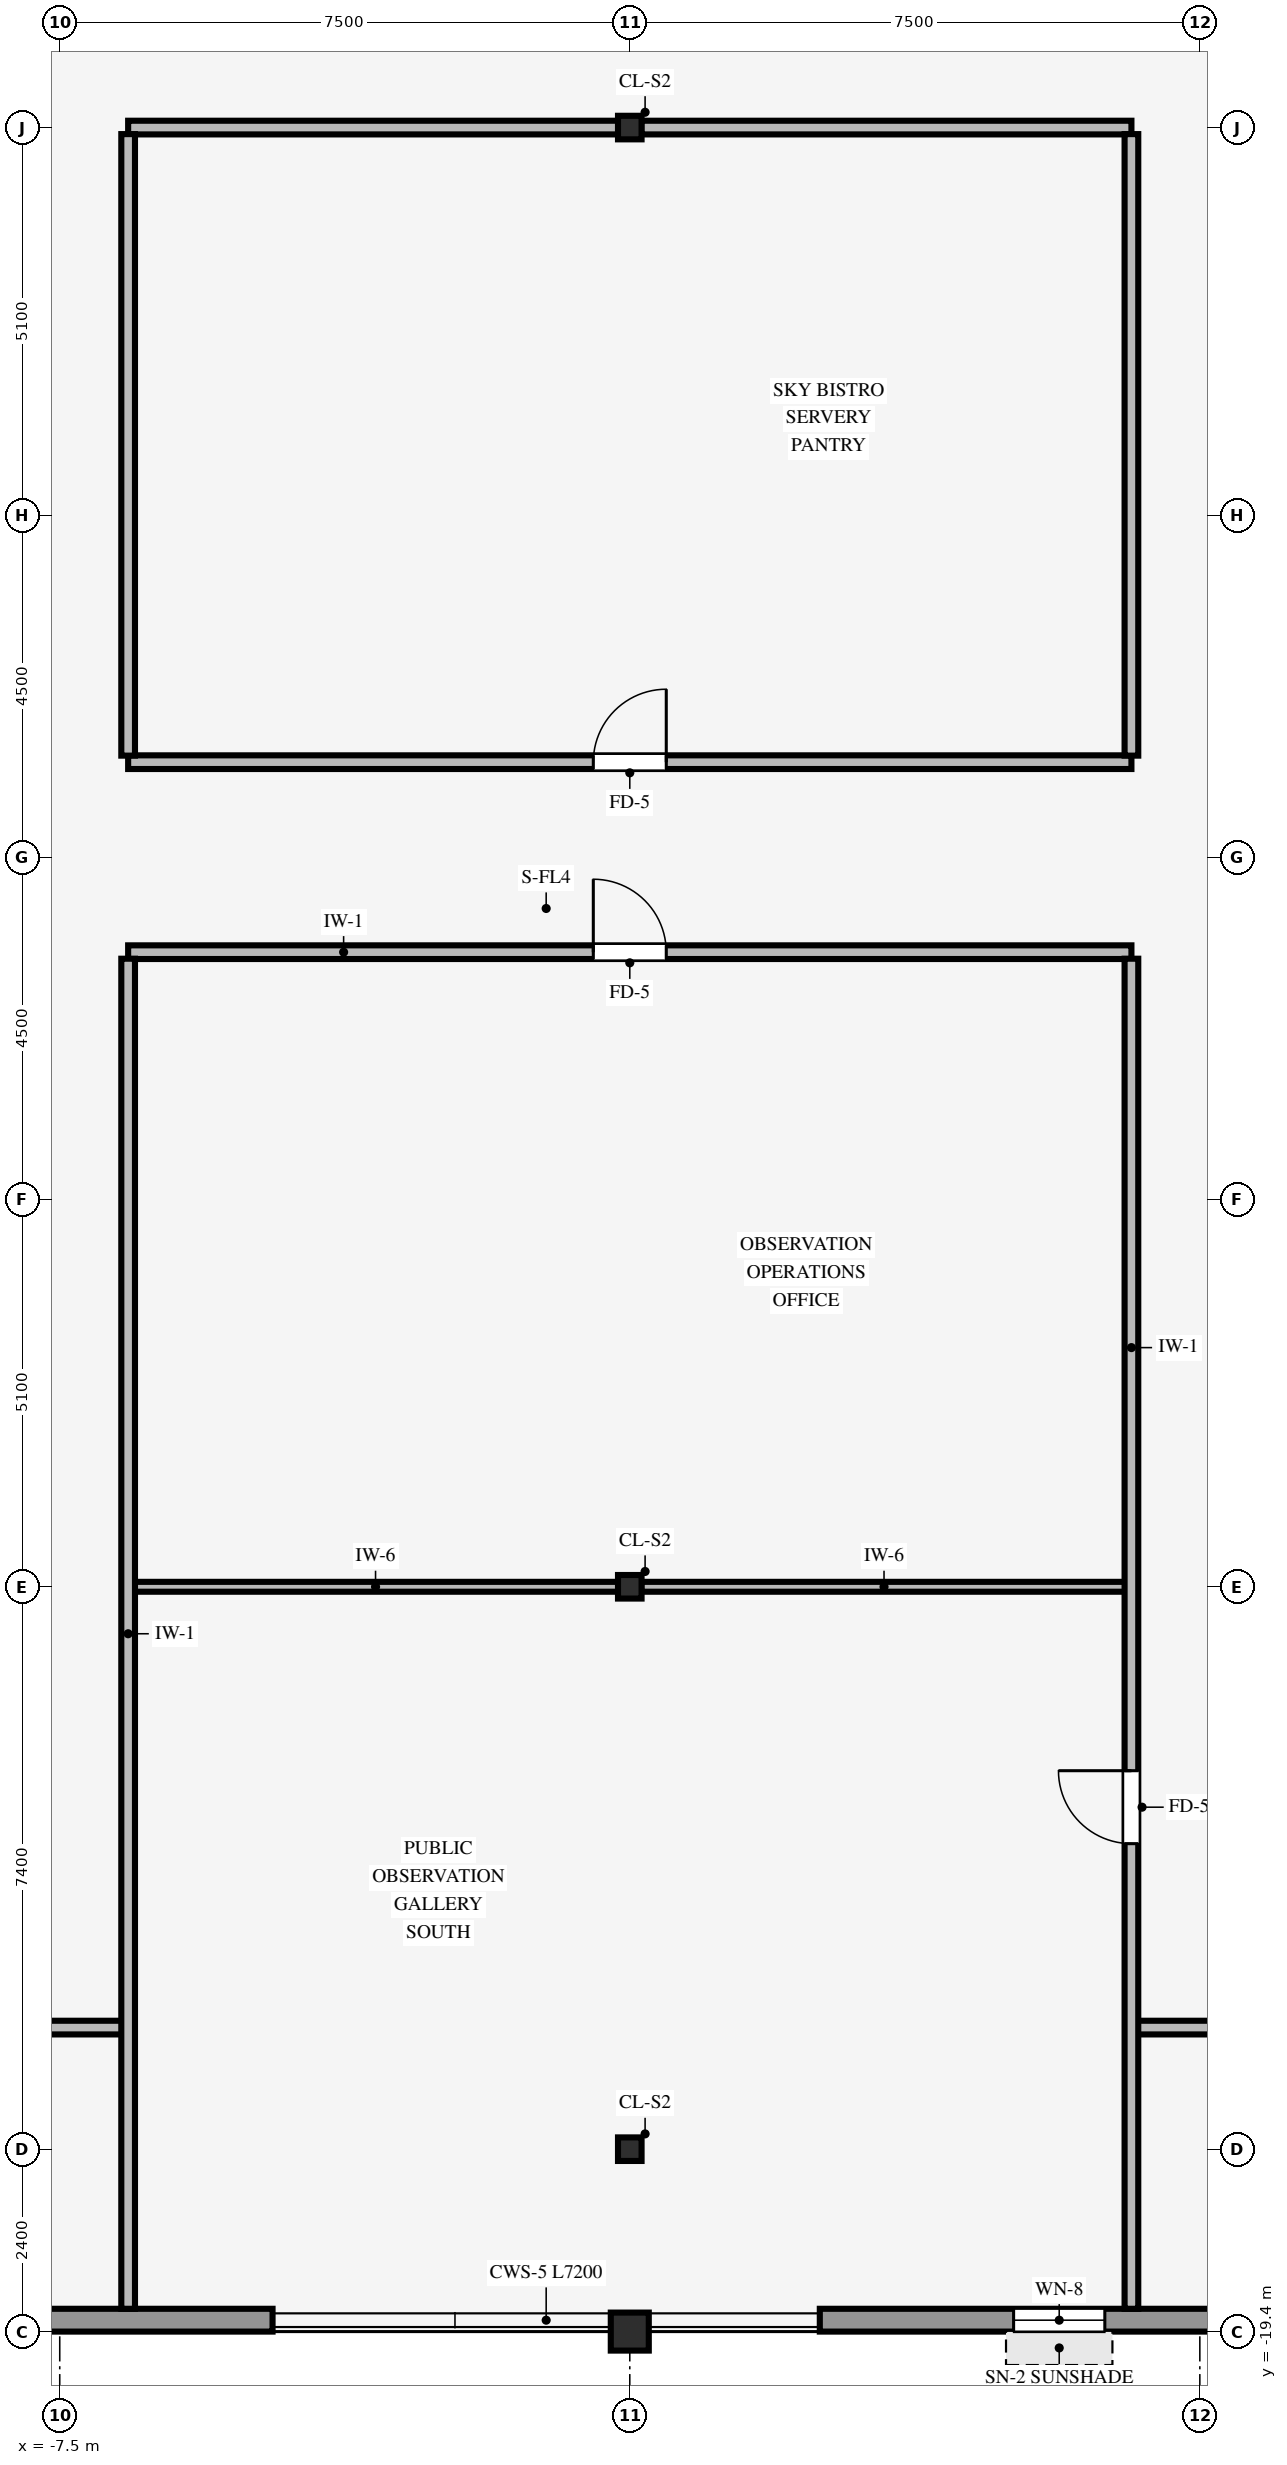
"""IFC4 building model, lengths in metres.
Left out: names, types, materials, properties, quantities, classifications, styles, units other than length and angle.
Written with IfcOpenShell. Run it as: python <this file> out.ifc"""

import sys

from ifc_helpers import new_model, si_unit, direction, frame, frame_2d, origin, origin_2d, place, context, subcontext, project, spatial, rectangle, hollow_rectangle, i_section, extrude, source, transform, mapped, element, fill, save


model = new_model("IFC4")
c1 = context("Model", 3, precision=1e-05, world=origin(), true_north=direction((0.0, 1.0)))
c2 = subcontext(c1, "Body", "Model", "MODEL_VIEW")
j1 = project(units=[si_unit("LENGTHUNIT", "METRE"), si_unit("PLANEANGLEUNIT", "RADIAN")], contexts=[c1])
p1 = place(None, origin())
s1 = spatial("IfcSite", under=j1, at=p1, CompositionType="ELEMENT")
p2 = place(p1, origin())
s2 = spatial("IfcBuilding", under=s1, at=p2, CompositionType="ELEMENT")
p3 = place(p2, frame((0.0, 0.0, 283.5)))
s3 = spatial("IfcBuildingStorey", under=s2, at=p3, CompositionType="ELEMENT", Elevation=283.5)
p4 = place(p3, frame((0.0, -19.4, 0.0), z_axis=(0.0, 0.0, 1.0), x_axis=(1.0, 0.0, 0.0)))
e1 = element("IfcColumn", 1, at=p4, inside=s3, PredefinedType="COLUMN", context=c2, shape_type="SweptSolid", body=[
    extrude(hollow_rectangle(XDim=0.5, YDim=0.5, WallThickness=0.032, InnerFilletRadius=0.032, OuterFilletRadius=0.064, at=origin_2d()), origin(), (0.0, 0.0, 1.0), 3.25),
])
for number, where, z_axis, x_axis in (
    (2, (0.0, -17.0, 0.0), (0.0, 0.0, 1.0), (1.0, 0.0, 0.0)),
    (3, (0.0, -9.6, 0.0), (0.0, 0.0, 1.0), (1.0, 0.0, 0.0)),
    (4, (0.0, 9.6, 0.0), (0.0, 0.0, 1.0), (1.0, 0.0, 0.0)),
):
    element("IfcColumn", number, at=place(p3, frame(where, z_axis=z_axis, x_axis=x_axis)), inside=s3, PredefinedType="COLUMN", context=c2, shape_type="SweptSolid", body=[
        extrude(i_section(OverallWidth=0.31, OverallDepth=0.31, WebThickness=0.015, FlangeThickness=0.015, FilletRadius=0.015, at=origin_2d()), origin(), (0.0, 0.0, 1.0), 3.25),
    ])
p5 = place(p3, frame((-18.9, -19.25, 0.0), z_axis=(0.0, 0.0, 1.0), x_axis=(1.0, 0.0, 0.0)))
e5 = element("IfcWall", 5, at=p5, inside=s3, PredefinedType="STANDARD", context=c2, shape_type="SweptSolid", body=[
    extrude(rectangle(XDim=14.2, YDim=0.3, at=frame_2d((7.1, 0.0))), origin(), (0.0, 0.0, 1.0), 3.24),
])
p6 = place(p5, frame((3.45, 0.0, 0.8)))
e6 = element("IfcOpeningElement", 6, at=p6, cuts=e5, PredefinedType="OPENING", context=c2, shape_type="SweptSolid", body=[
    extrude(rectangle(XDim=1.2, YDim=1.48, at=frame_2d((0.6, 0.74))), frame((0.0, 0.16, 0.0), z_axis=(0.0, -1.0, 0.0), x_axis=(1.0, 0.0, 0.0)), (0.0, 0.0, 1.0), 0.32),
])
p7 = place(p3, frame((2.5, -19.25, 0.0), z_axis=(0.0, 0.0, 1.0), x_axis=(1.0, 0.0, 0.0)))
e7 = element("IfcWall", 7, at=p7, inside=s3, PredefinedType="STANDARD", context=c2, shape_type="SweptSolid", body=[
    extrude(rectangle(XDim=14.2, YDim=0.3, at=frame_2d((7.1, 0.0))), origin(), (0.0, 0.0, 1.0), 3.24),
])
p8 = place(p7, frame((2.55, 0.0, 0.8)))
e8 = element("IfcOpeningElement", 8, at=p8, cuts=e7, PredefinedType="OPENING", context=c2, shape_type="SweptSolid", body=[
    extrude(rectangle(XDim=1.2, YDim=1.48, at=frame_2d((0.6, 0.74))), frame((0.0, 0.16, 0.0), z_axis=(0.0, -1.0, 0.0), x_axis=(1.0, 0.0, 0.0)), (0.0, 0.0, 1.0), 0.32),
])
p9 = place(p7, frame((9.55, 0.0, 0.8)))
e9 = element("IfcOpeningElement", 9, at=p9, cuts=e7, PredefinedType="OPENING", context=c2, shape_type="SweptSolid", body=[
    extrude(rectangle(XDim=1.2, YDim=1.48, at=frame_2d((0.6, 0.74))), frame((0.0, 0.16, 0.0), z_axis=(0.0, -1.0, 0.0), x_axis=(1.0, 0.0, 0.0)), (0.0, 0.0, 1.0), 0.32),
])
for number, where, z_axis, x_axis in (
    (10, (-9.0, -15.4, 0.0), (0.0, 0.0, 1.0), (1.0, 0.0, 0.0)),
    (11, (6.661, -15.4, 0.0), (0.0, 0.0, 1.0), (1.0, 0.0, 0.0)),
):
    element("IfcWall", number, at=place(p3, frame(where, z_axis=z_axis, x_axis=x_axis)), inside=s3, PredefinedType="PARTITIONING", context=c2, shape_type="SweptSolid", body=[
        extrude(rectangle(XDim=2.339, YDim=0.18, at=frame_2d((1.169, 0.0))), origin(), (0.0, 0.0, 1.0), 3.24),
    ])
for number, where, z_axis, x_axis in (
    (12, (-6.539, -9.6, 0.0), (0.0, 0.0, 1.0), (1.0, 0.0, 0.0)),
    (13, (0.151, -9.6, 0.0), (0.0, 0.0, 1.0), (1.0, 0.0, 0.0)),
):
    element("IfcWall", number, at=place(p3, frame(where, z_axis=z_axis, x_axis=x_axis)), inside=s3, PredefinedType="PARTITIONING", context=c2, shape_type="SweptSolid", body=[
        extrude(rectangle(XDim=6.388, YDim=0.13, at=frame_2d((3.194, 0.0))), origin(), (0.0, 0.0, 1.0), 2.285),
    ])
p10 = place(p3, frame((-6.6, -1.25, 0.0), z_axis=(0.0, 0.0, 1.0), x_axis=(1.0, 0.0, 0.0)))
e14 = element("IfcWall", 14, at=p10, inside=s3, PredefinedType="PARTITIONING", context=c2, shape_type="SweptSolid", body=[
    extrude(rectangle(XDim=13.2, YDim=0.18, at=frame_2d((6.6, 0.0))), origin(), (0.0, 0.0, 1.0), 3.24),
])
p11 = place(p10, frame((6.12, 0.0, 0.0)))
e15 = element("IfcOpeningElement", 15, at=p11, cuts=e14, PredefinedType="OPENING", context=c2, shape_type="SweptSolid", body=[
    extrude(rectangle(XDim=0.96, YDim=2.1, at=frame_2d((0.48, 1.05))), frame((0.0, 0.1, 0.0), z_axis=(0.0, -1.0, 0.0), x_axis=(1.0, 0.0, 0.0)), (0.0, 0.0, 1.0), 0.2),
])
p12 = place(p3, frame((-6.6, 1.25, 0.0), z_axis=(0.0, 0.0, 1.0), x_axis=(1.0, 0.0, 0.0)))
e16 = element("IfcWall", 16, at=p12, inside=s3, PredefinedType="PARTITIONING", context=c2, shape_type="SweptSolid", body=[
    extrude(rectangle(XDim=13.2, YDim=0.18, at=frame_2d((6.6, 0.0))), origin(), (0.0, 0.0, 1.0), 3.24),
])
p13 = place(p12, frame((6.12, 0.0, 0.0)))
e17 = element("IfcOpeningElement", 17, at=p13, cuts=e16, PredefinedType="OPENING", context=c2, shape_type="SweptSolid", body=[
    extrude(rectangle(XDim=0.96, YDim=2.1, at=frame_2d((0.48, 1.05))), frame((0.0, 0.1, 0.0), z_axis=(0.0, -1.0, 0.0), x_axis=(1.0, 0.0, 0.0)), (0.0, 0.0, 1.0), 0.2),
])
for number, where, z_axis, x_axis in (
    (18, (-6.6, 9.6, 0.0), (0.0, 0.0, 1.0), (1.0, 0.0, 0.0)),
    (19, (0.151, 9.6, 0.0), (0.0, 0.0, 1.0), (1.0, 0.0, 0.0)),
):
    element("IfcWall", number, at=place(p3, frame(where, z_axis=z_axis, x_axis=x_axis)), inside=s3, PredefinedType="PARTITIONING", context=c2, shape_type="SweptSolid", body=[
        extrude(rectangle(XDim=6.449, YDim=0.18, at=frame_2d((3.225, 0.0))), origin(), (0.0, 0.0, 1.0), 2.285),
    ])
p14 = place(p3, frame((-6.6, -19.1, 0.0), z_axis=(0.0, 0.0, 1.0), x_axis=(0.0, 1.0, 0.0)))
e20 = element("IfcWall", 20, at=p14, inside=s3, PredefinedType="PARTITIONING", context=c2, shape_type="SweptSolid", body=[
    extrude(rectangle(XDim=17.764, YDim=0.18, at=frame_2d((8.882, 0.0))), origin(), (0.0, 0.0, 1.0), 3.24),
])
p15 = place(p3, frame((-6.6, 1.336, 0.0), z_axis=(0.0, 0.0, 1.0), x_axis=(0.0, 1.0, 0.0)))
e21 = element("IfcWall", 21, at=p15, inside=s3, PredefinedType="PARTITIONING", context=c2, shape_type="SweptSolid", body=[
    extrude(rectangle(XDim=8.178, YDim=0.18, at=frame_2d((4.089, 0.0))), origin(), (0.0, 0.0, 1.0), 3.24),
])
p16 = place(p3, frame((6.6, -19.1, 0.0), z_axis=(0.0, 0.0, 1.0), x_axis=(0.0, 1.0, 0.0)))
e22 = element("IfcWall", 22, at=p16, inside=s3, PredefinedType="PARTITIONING", context=c2, shape_type="SweptSolid", body=[
    extrude(rectangle(XDim=17.764, YDim=0.18, at=frame_2d((8.882, 0.0))), origin(), (0.0, 0.0, 1.0), 3.24),
])
p17 = place(p16, frame((6.12, 0.0, 0.0)))
e23 = element("IfcOpeningElement", 23, at=p17, cuts=e22, PredefinedType="OPENING", context=c2, shape_type="SweptSolid", body=[
    extrude(rectangle(XDim=0.96, YDim=2.1, at=frame_2d((0.48, 1.05))), frame((0.0, 0.1, 0.0), z_axis=(0.0, -1.0, 0.0), x_axis=(1.0, 0.0, 0.0)), (0.0, 0.0, 1.0), 0.2),
])
p18 = place(p3, frame((6.6, 1.336, 0.0), z_axis=(0.0, 0.0, 1.0), x_axis=(0.0, 1.0, 0.0)))
e24 = element("IfcWall", 24, at=p18, inside=s3, PredefinedType="PARTITIONING", context=c2, shape_type="SweptSolid", body=[
    extrude(rectangle(XDim=8.178, YDim=0.18, at=frame_2d((4.089, 0.0))), origin(), (0.0, 0.0, 1.0), 3.24),
])
m1 = source(origin(), c2, "Body", "SweptSolid", [
    extrude(rectangle(XDim=1.2, YDim=1.48, at=frame_2d((0.6, 0.74))), frame((0.0, 0.03, 0.0), z_axis=(0.0, -1.0, 0.0), x_axis=(1.0, 0.0, 0.0)), (0.0, 0.0, 1.0), 0.06),
])
p19 = place(p8, origin())
e25 = element("IfcWindow", 25, at=p19, inside=s3, PartitioningType="SINGLE_PANEL", PredefinedType="WINDOW", context=c2, shape_type="MappedRepresentation", body=[
    mapped(m1, transform((0.0, 0.0, 0.0), scale=1.0)),
])
fill(e8, e25)
m2 = source(origin(), c2, "Body", "SweptSolid", [
    extrude(rectangle(XDim=0.96, YDim=2.1, at=frame_2d((0.48, 1.05))), frame((0.0, 0.025, 0.0), z_axis=(0.0, -1.0, 0.0), x_axis=(1.0, 0.0, 0.0)), (0.0, 0.0, 1.0), 0.05),
])
p20 = place(p13, origin())
e26 = element("IfcDoor", 26, at=p20, inside=s3, OperationType="SINGLE_SWING_RIGHT", PredefinedType="DOOR", context=c2, shape_type="MappedRepresentation", body=[
    mapped(m2, transform((0.0, 0.0, 0.0), scale=1.0)),
])
fill(e17, e26)
p21 = place(p11, origin())
e27 = element("IfcDoor", 27, at=p21, inside=s3, OperationType="SINGLE_SWING_LEFT", PredefinedType="DOOR", context=c2, shape_type="MappedRepresentation", body=[
    mapped(m2, transform((0.0, 0.0, 0.0), scale=1.0)),
])
fill(e15, e27)
p22 = place(p17, origin())
e28 = element("IfcDoor", 28, at=p22, inside=s3, OperationType="SINGLE_SWING_RIGHT", PredefinedType="DOOR", context=c2, shape_type="MappedRepresentation", body=[
    mapped(m2, transform((0.0, 0.0, 0.0), scale=1.0)),
])
fill(e23, e28)
save(model, sys.argv[1])
